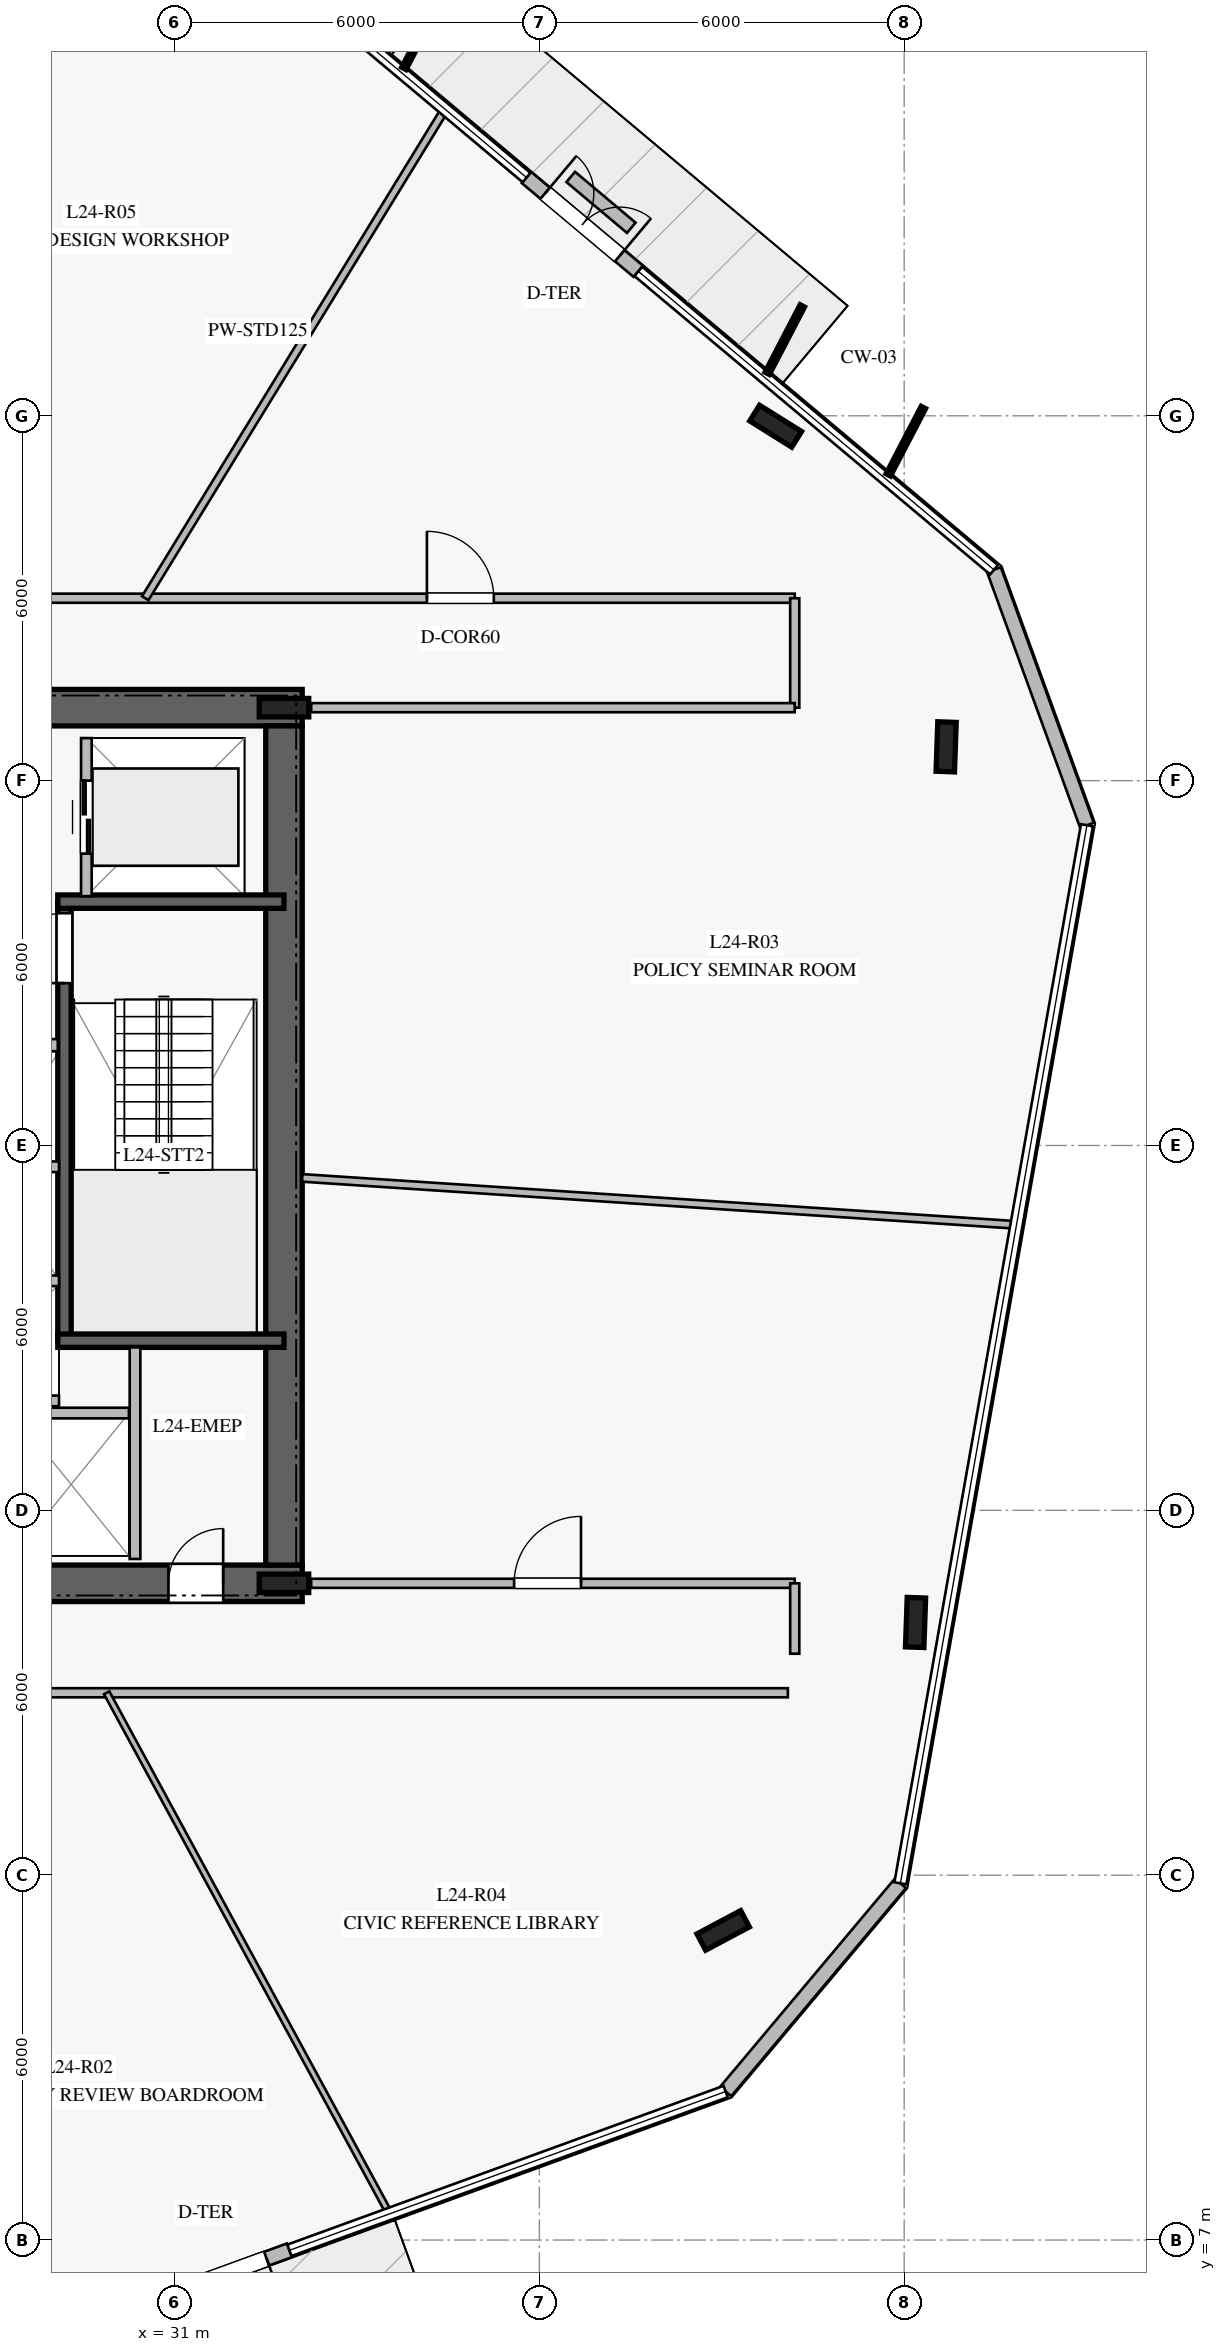
"""IFC4 building model, lengths in metres.
Left out: names, types, materials, properties, quantities, classifications, styles, units other than length and angle.
Written with IfcOpenShell. Run it as: python <this file> out.ifc"""

import sys

from ifc_helpers import new_model, si_unit, direction, frame, frame_2d, origin, origin_2d, place, context, subcontext, project, spatial, rectangle, i_section, extrude, element, fill, save


model = new_model("IFC4")
c1 = context("Model", 3, precision=1e-05, world=origin(), true_north=direction((0.0, 1.0)))
c2 = subcontext(c1, "Body", "Model", "MODEL_VIEW")
j1 = project(units=[si_unit("LENGTHUNIT", "METRE"), si_unit("PLANEANGLEUNIT", "RADIAN")], contexts=[c1])
p1 = place(None, origin())
s1 = spatial("IfcSite", under=j1, at=p1, CompositionType="ELEMENT")
p2 = place(p1, origin())
s2 = spatial("IfcBuilding", under=s1, at=p2, CompositionType="ELEMENT")
p3 = place(p2, frame((0.0, 0.0, 102.4)))
s3 = spatial("IfcBuildingStorey", under=s2, at=p3, CompositionType="ELEMENT", Elevation=102.4)
p4 = place(p3, frame((16.9, 17.8, 0.0), z_axis=(0.0, 0.0, 1.0), x_axis=(1.0, 0.0, 0.0)))
e1 = element("IfcWall", 1, at=p4, inside=s3, PredefinedType="SHEAR", context=c2, shape_type="SweptSolid", body=[
    extrude(rectangle(XDim=16.2, YDim=0.6, at=frame_2d((8.1, 0.0))), origin(), (0.0, 0.0, 1.0), 3.76),
])
p5 = place(p4, frame((5.05, 0.0, 0.0)))
e2 = element("IfcOpeningElement", 2, at=p5, cuts=e1, PredefinedType="OPENING", context=c2, shape_type="SweptSolid", body=[
    extrude(rectangle(XDim=1.2, YDim=2.25, at=frame_2d((0.6, 1.125))), frame((0.0, 0.31, 0.0), z_axis=(0.0, -1.0, 0.0), x_axis=(1.0, 0.0, 0.0)), (0.0, 0.0, 1.0), 0.62),
])
p6 = place(p4, frame((14.0, 0.0, 0.0)))
e3 = element("IfcOpeningElement", 3, at=p6, cuts=e1, PredefinedType="OPENING", context=c2, shape_type="SweptSolid", body=[
    extrude(rectangle(XDim=0.9, YDim=2.1, at=frame_2d((0.45, 1.05))), frame((0.0, 0.31, 0.0), z_axis=(0.0, -1.0, 0.0), x_axis=(1.0, 0.0, 0.0)), (0.0, 0.0, 1.0), 0.62),
])
p7 = place(p3, frame((33.1, 32.2, 0.0), z_axis=(0.0, 0.0, 1.0), x_axis=(-1.0, 0.0, 0.0)))
e4 = element("IfcWall", 4, at=p7, inside=s3, PredefinedType="SHEAR", context=c2, shape_type="SweptSolid", body=[
    extrude(rectangle(XDim=16.2, YDim=0.6, at=frame_2d((8.1, 0.0))), origin(), (0.0, 0.0, 1.0), 3.76),
])
p8 = place(p7, frame((5.05, 0.0, 0.0)))
e5 = element("IfcOpeningElement", 5, at=p8, cuts=e4, PredefinedType="OPENING", context=c2, shape_type="SweptSolid", body=[
    extrude(rectangle(XDim=1.2, YDim=2.25, at=frame_2d((0.6, 1.125))), frame((0.0, 0.31, 0.0), z_axis=(0.0, -1.0, 0.0), x_axis=(1.0, 0.0, 0.0)), (0.0, 0.0, 1.0), 0.62),
])
p9 = place(p7, frame((11.85, 0.0, 0.0)))
e6 = element("IfcOpeningElement", 6, at=p9, cuts=e4, PredefinedType="OPENING", context=c2, shape_type="SweptSolid", body=[
    extrude(rectangle(XDim=1.1, YDim=2.2, at=frame_2d((0.55, 1.1))), frame((0.0, 0.31, 0.0), z_axis=(0.0, -1.0, 0.0), x_axis=(1.0, 0.0, 0.0)), (0.0, 0.0, 1.0), 0.62),
])
p10 = place(p7, frame((9.875, 0.0, 0.0)))
e7 = element("IfcOpeningElement", 7, at=p10, cuts=e4, PredefinedType="OPENING", context=c2, shape_type="SweptSolid", body=[
    extrude(rectangle(XDim=1.1, YDim=2.2, at=frame_2d((0.55, 1.1))), frame((0.0, 0.31, 0.0), z_axis=(0.0, -1.0, 0.0), x_axis=(1.0, 0.0, 0.0)), (0.0, 0.0, 1.0), 0.62),
])
p11 = place(p7, frame((7.9, 0.0, 0.0)))
e8 = element("IfcOpeningElement", 8, at=p11, cuts=e4, PredefinedType="OPENING", context=c2, shape_type="SweptSolid", body=[
    extrude(rectangle(XDim=1.1, YDim=2.2, at=frame_2d((0.55, 1.1))), frame((0.0, 0.31, 0.0), z_axis=(0.0, -1.0, 0.0), x_axis=(1.0, 0.0, 0.0)), (0.0, 0.0, 1.0), 0.62),
])
p12 = place(p3, frame((32.8, 18.1, 0.0), z_axis=(0.0, 0.0, 1.0), x_axis=(0.0, 1.0, 0.0)))
e9 = element("IfcWall", 9, at=p12, inside=s3, PredefinedType="SHEAR", context=c2, shape_type="SweptSolid", body=[
    extrude(rectangle(XDim=13.8, YDim=0.6, at=frame_2d((6.9, 0.0))), origin(), (0.0, 0.0, 1.0), 3.76),
])
for number, where, z_axis, x_axis in (
    (10, (32.8, 17.8, 0.0), (0.0, 0.0, 1.0), (1.0, 0.0, 0.0)),
    (11, (32.8, 32.2, 0.0), (0.0, 0.0, 1.0), (1.0, 0.0, 0.0)),
):
    element("IfcColumn", number, at=place(p3, frame(where, z_axis=z_axis, x_axis=x_axis)), inside=s3, PredefinedType="COLUMN", context=c2, shape_type="SweptSolid", body=[
        extrude(i_section(OverallWidth=0.303, OverallDepth=0.814, WebThickness=0.021, FlangeThickness=0.04, at=origin_2d()), origin(), (0.0, 0.0, 1.0), 4.0),
    ])
p13 = place(p3, frame((29.19, 21.79, 0.0), z_axis=(0.0, 0.0, 1.0), x_axis=(0.0, 1.0, 0.0)))
e12 = element("IfcWall", 12, at=p13, inside=s3, PredefinedType="SOLIDWALL", context=c2, shape_type="SweptSolid", body=[
    extrude(rectangle(XDim=7.22, YDim=0.22, at=frame_2d((3.61, 0.0))), origin(), (0.0, 0.0, 1.0), 3.76),
])
p14 = place(p13, frame((5.88, 0.0, 0.0)))
e13 = element("IfcOpeningElement", 13, at=p14, cuts=e12, PredefinedType="OPENING", context=c2, shape_type="SweptSolid", body=[
    extrude(rectangle(XDim=1.15, YDim=2.2, at=frame_2d((0.575, 1.1))), frame((0.0, 0.12, 0.0), z_axis=(0.0, -1.0, 0.0), x_axis=(1.0, 0.0, 0.0)), (0.0, 0.0, 1.0), 0.24),
])
for number, where, z_axis, x_axis in (
    (14, (29.08, 21.79, 0.0), (0.0, 0.0, 1.0), (1.0, 0.0, 0.0)),
    (15, (29.08, 29.01, 0.0), (0.0, 0.0, 1.0), (1.0, 0.0, 0.0)),
):
    element("IfcWall", number, at=place(p3, frame(where, z_axis=z_axis, x_axis=x_axis)), inside=s3, PredefinedType="SOLIDWALL", context=c2, shape_type="SweptSolid", body=[
        extrude(rectangle(XDim=3.72, YDim=0.22, at=frame_2d((1.86, 0.0))), origin(), (0.0, 0.0, 1.0), 3.76),
    ])
for number, where, z_axis, x_axis in (
    (16, (40.886, 36.829, 0.0), (0.0, 0.0, 1.0), (-0.848, 0.53, 0.0)),
    (17, (40.023, 12.092, 0.0), (0.0, 0.0, 1.0), (0.883, 0.469, 0.0)),
    (18, (43.187, 17.156, 0.0), (0.0, 0.0, 1.0), (0.035, 0.999, 0.0)),
    (19, (43.69, 31.556, 0.0), (0.0, 0.0, 1.0), (0.035, 0.999, 0.0)),
):
    element("IfcColumn", number, at=place(p3, frame(where, z_axis=z_axis, x_axis=x_axis)), inside=s3, PredefinedType="COLUMN", context=c2, shape_type="SweptSolid", body=[
        extrude(i_section(OverallWidth=0.303, OverallDepth=0.814, WebThickness=0.021, FlangeThickness=0.04, at=origin_2d()), origin(), (0.0, 0.0, 1.0), 4.0),
    ])
p15 = place(p3, frame((38.628, 39.375, 0.0), z_axis=(0.0, 0.0, 1.0), x_axis=(-0.766049372112, 0.642781735495, 0.0)))
e20 = element("IfcWall", 20, at=p15, inside=s3, PredefinedType="STANDARD", context=c2, shape_type="SweptSolid", body=[
    extrude(rectangle(XDim=2.4, YDim=0.24, at=frame_2d((1.2, 0.0))), origin(), (0.0, 0.0, 1.0), 3.76),
])
p16 = place(p15, frame((0.4, 0.0, 0.0)))
e21 = element("IfcOpeningElement", 21, at=p16, cuts=e20, PredefinedType="OPENING", context=c2, shape_type="SweptSolid", body=[
    extrude(rectangle(XDim=1.6, YDim=2.25, at=frame_2d((0.8, 1.125))), frame((0.0, 0.13, 0.0), z_axis=(0.0, -1.0, 0.0), x_axis=(1.0, 0.0, 0.0)), (0.0, 0.0, 1.0), 0.26),
])
p17 = place(p3, frame((30.635, 6.01, 0.0), z_axis=(0.0, 0.0, 1.0), x_axis=(0.939647786753, 0.342143298706, 0.0)))
e22 = element("IfcWall", 22, at=p17, inside=s3, PredefinedType="STANDARD", context=c2, shape_type="SweptSolid", body=[
    extrude(rectangle(XDim=2.4, YDim=0.24, at=frame_2d((1.2, 0.0))), origin(), (0.0, 0.0, 1.0), 3.76),
])
p18 = place(p17, frame((0.4, 0.0, 0.0)))
e23 = element("IfcOpeningElement", 23, at=p18, cuts=e22, PredefinedType="OPENING", context=c2, shape_type="SweptSolid", body=[
    extrude(rectangle(XDim=1.6, YDim=2.25, at=frame_2d((0.8, 1.125))), frame((0.0, 0.13, 0.0), z_axis=(0.0, -1.0, 0.0), x_axis=(1.0, 0.0, 0.0)), (0.0, 0.0, 1.0), 0.26),
])
for number, where, z_axis, x_axis in (
    (24, (40.064, 9.442, 0.0), (0.0, 0.0, 1.0), (0.643, 0.766, 0.0)),
    (25, (46.006, 30.267, 0.0), (0.0, 0.0, 1.0), (-0.342, 0.94, 0.0)),
):
    element("IfcWall", number, at=place(p3, frame(where, z_axis=z_axis, x_axis=x_axis)), inside=s3, PredefinedType="STANDARD", context=c2, shape_type="SweptSolid", body=[
        extrude(rectangle(XDim=4.47, YDim=0.24, at=frame_2d((2.235, 0.0))), origin(), (0.0, 0.0, 1.0), 3.76),
    ])
p19 = place(p3, frame((38.512, 40.092, 0.0), z_axis=(0.0, 0.0, 1.0), x_axis=(-0.765923066334, 0.642932233177, 0.0)))
e26 = element("IfcWall", 26, at=p19, inside=s3, PredefinedType="USERDEFINED", context=c2, shape_type="SweptSolid", body=[
    extrude(rectangle(XDim=1.3, YDim=0.22, at=frame_2d((0.65, 0.0))), origin(), (0.0, 0.0, 1.0), 0.4),
])
p20 = place(p3, frame((25.7, 26.65, 0.0), z_axis=(0.0, 0.0, 1.0), x_axis=(1.0, 0.0, 0.0)))
e27 = element("IfcWall", 27, at=p20, inside=s3, PredefinedType="PARTITIONING", context=c2, shape_type="SweptSolid", body=[
    extrude(rectangle(XDim=3.38, YDim=0.2, at=frame_2d((1.69, 0.0))), origin(), (0.0, 0.0, 1.0), 3.76),
])
p21 = place(p3, frame((30.35, 18.2, 0.0), z_axis=(0.0, 0.0, 1.0), x_axis=(0.0, 1.0, 0.0)))
e28 = element("IfcWall", 28, at=p21, inside=s3, PredefinedType="PARTITIONING", context=c2, shape_type="SweptSolid", body=[
    extrude(rectangle(XDim=3.48, YDim=0.175, at=frame_2d((1.74, 0.0))), origin(), (0.0, 0.0, 1.0), 3.76),
])
p22 = place(p3, frame((28.35, 20.6, 0.0), z_axis=(0.0, 0.0, 1.0), x_axis=(1.0, 0.0, 0.0)))
e29 = element("IfcWall", 29, at=p22, inside=s3, PredefinedType="PARTITIONING", context=c2, shape_type="SweptSolid", body=[
    extrude(rectangle(XDim=1.9, YDim=0.175, at=frame_2d((0.95, 0.0))), origin(), (0.0, 0.0, 1.0), 3.76),
])
for number, where, z_axis, x_axis in (
    (30, (26.75, 20.8, 0.0), (0.0, 0.0, 1.0), (1.0, 0.0, 0.0)),
    (31, (26.75, 22.775, 0.0), (0.0, 0.0, 1.0), (1.0, 0.0, 0.0)),
    (32, (26.75, 24.65, 0.0), (0.0, 0.0, 1.0), (1.0, 0.0, 0.0)),
):
    element("IfcWall", number, at=place(p3, frame(where, z_axis=z_axis, x_axis=x_axis)), inside=s3, PredefinedType="PARTITIONING", context=c2, shape_type="SweptSolid", body=[
        extrude(rectangle(XDim=2.35, YDim=0.175, at=frame_2d((1.175, 0.0))), origin(), (0.0, 0.0, 1.0), 3.76),
    ])
p23 = place(p3, frame((29.55, 29.1, 0.0), z_axis=(0.0, 0.0, 1.0), x_axis=(0.0, 1.0, 0.0)))
e33 = element("IfcWall", 33, at=p23, inside=s3, PredefinedType="PARTITIONING", context=c2, shape_type="SweptSolid", body=[
    extrude(rectangle(XDim=2.6, YDim=0.175, at=frame_2d((1.3, 0.0))), origin(), (0.0, 0.0, 1.0), 3.76),
])
p24 = place(p23, frame((0.7, 0.0, 0.0)))
e34 = element("IfcOpeningElement", 34, at=p24, cuts=e33, PredefinedType="OPENING", context=c2, shape_type="SweptSolid", body=[
    extrude(rectangle(XDim=1.2, YDim=2.2, at=frame_2d((0.6, 1.1))), frame((0.0, 0.098, 0.0), z_axis=(0.0, -1.0, 0.0), x_axis=(1.0, 0.0, 0.0)), (0.0, 0.0, 1.0), 0.195),
])
p25 = place(p3, frame((25.95, 34.0, 0.0), z_axis=(0.0, 0.0, 1.0), x_axis=(1.0, 0.0, 0.0)))
e35 = element("IfcWall", 35, at=p25, inside=s3, PredefinedType="PARTITIONING", context=c2, shape_type="SweptSolid", body=[
    extrude(rectangle(XDim=15.25, YDim=0.15, at=frame_2d((7.625, 0.0))), origin(), (0.0, 0.0, 1.0), 3.21),
])
p26 = place(p25, frame((9.201, 0.0, 0.0)))
e36 = element("IfcOpeningElement", 36, at=p26, cuts=e35, PredefinedType="OPENING", context=c2, shape_type="SweptSolid", body=[
    extrude(rectangle(XDim=1.1, YDim=2.2, at=frame_2d((0.55, 1.1))), frame((0.0, 0.085, 0.0), z_axis=(0.0, -1.0, 0.0), x_axis=(1.0, 0.0, 0.0)), (0.0, 0.0, 1.0), 0.17),
])
p27 = place(p3, frame((41.2, 34.0, 0.0), z_axis=(0.0, 0.0, 1.0), x_axis=(0.0, -1.0, 0.0)))
e37 = element("IfcWall", 37, at=p27, inside=s3, PredefinedType="PARTITIONING", context=c2, shape_type="SweptSolid", body=[
    extrude(rectangle(XDim=1.8, YDim=0.15, at=frame_2d((0.9, 0.0))), origin(), (0.0, 0.0, 1.0), 3.76),
])
p28 = place(p3, frame((41.2, 32.2, 0.0), z_axis=(0.0, 0.0, 1.0), x_axis=(-1.0, 0.0, 0.0)))
e38 = element("IfcWall", 38, at=p28, inside=s3, PredefinedType="PARTITIONING", context=c2, shape_type="SweptSolid", body=[
    extrude(rectangle(XDim=7.953, YDim=0.15, at=frame_2d((3.977, 0.0))), origin(), (0.0, 0.0, 1.0), 3.21),
])
p29 = place(p3, frame((33.247, 17.8, 0.0), z_axis=(0.0, 0.0, 1.0), x_axis=(1.0, 0.0, 0.0)))
e39 = element("IfcWall", 39, at=p29, inside=s3, PredefinedType="PARTITIONING", context=c2, shape_type="SweptSolid", body=[
    extrude(rectangle(XDim=7.953, YDim=0.15, at=frame_2d((3.977, 0.0))), origin(), (0.0, 0.0, 1.0), 3.05),
])
p30 = place(p29, frame((3.338, 0.0, 0.0)))
e40 = element("IfcOpeningElement", 40, at=p30, cuts=e39, PredefinedType="OPENING", context=c2, shape_type="SweptSolid", body=[
    extrude(rectangle(XDim=1.1, YDim=2.2, at=frame_2d((0.55, 1.1))), frame((0.0, 0.085, 0.0), z_axis=(0.0, -1.0, 0.0), x_axis=(1.0, 0.0, 0.0)), (0.0, 0.0, 1.0), 0.17),
])
p31 = place(p3, frame((41.2, 17.8, 0.0), z_axis=(0.0, 0.0, 1.0), x_axis=(0.0, -1.0, 0.0)))
e41 = element("IfcWall", 41, at=p31, inside=s3, PredefinedType="PARTITIONING", context=c2, shape_type="SweptSolid", body=[
    extrude(rectangle(XDim=1.158, YDim=0.15, at=frame_2d((0.579, 0.0))), origin(), (0.0, 0.0, 1.0), 3.21),
])
p32 = place(p3, frame((41.087, 16.0, 0.0), z_axis=(0.0, 0.0, 1.0), x_axis=(-1.0, 0.0, 0.0)))
e42 = element("IfcWall", 42, at=p32, inside=s3, PredefinedType="PARTITIONING", context=c2, shape_type="SweptSolid", body=[
    extrude(rectangle(XDim=15.137, YDim=0.15, at=frame_2d((7.568, 0.0))), origin(), (0.0, 0.0, 1.0), 3.21),
])
p33 = place(p32, frame((12.332, 0.0, 0.0)))
e43 = element("IfcOpeningElement", 43, at=p33, cuts=e42, PredefinedType="OPENING", context=c2, shape_type="SweptSolid", body=[
    extrude(rectangle(XDim=1.1, YDim=2.2, at=frame_2d((0.55, 1.1))), frame((0.0, 0.085, 0.0), z_axis=(0.0, -1.0, 0.0), x_axis=(1.0, 0.0, 0.0)), (0.0, 0.0, 1.0), 0.17),
])
p34 = place(p3, frame((30.518, 34.0, 0.0), z_axis=(0.0, 0.0, 1.0), x_axis=(0.522673308886, 0.852533056355, 0.0)))
e44 = element("IfcWall", 44, at=p34, inside=s3, PredefinedType="PARTITIONING", context=c2, shape_type="SweptSolid", body=[
    extrude(rectangle(XDim=9.417, YDim=0.125, at=frame_2d((4.708, 0.0))), origin(), (0.0, 0.0, 1.0), 3.16),
])
p35 = place(p3, frame((29.884, 16.0, 0.0), z_axis=(0.0, 0.0, 1.0), x_axis=(0.477009387534, -0.878898199, 0.0)))
e45 = element("IfcWall", 45, at=p35, inside=s3, PredefinedType="MOVABLE", context=c2, shape_type="SweptSolid", body=[
    extrude(rectangle(XDim=9.734, YDim=0.1, at=frame_2d((4.867, 0.0))), origin(), (0.0, 0.0, 1.0), 3.16),
])
p36 = place(p3, frame((33.1, 24.467, 0.0), z_axis=(0.0, 0.0, 1.0), x_axis=(0.997841404392, -0.06566986889, 0.0)))
e46 = element("IfcWall", 46, at=p36, inside=s3, PredefinedType="PARTITIONING", context=c2, shape_type="SweptSolid", body=[
    extrude(rectangle(XDim=11.755, YDim=0.125, at=frame_2d((5.878, 0.0))), origin(), (0.0, 0.0, 1.0), 3.05),
])
p37 = place(p16, frame((1.6, 0.0, 0.0), z_axis=(0.0, 0.0, 1.0), x_axis=(-1.0, 0.0, 0.0)))
e47 = element("IfcDoor", 47, at=p37, inside=s3, OperationType="DOUBLE_DOOR_SINGLE_SWING", PredefinedType="DOOR", context=c2, shape_type="SweptSolid", body=[
    extrude(rectangle(XDim=1.6, YDim=2.25, at=frame_2d((0.8, 1.125))), frame((0.0, 0.025, 0.0), z_axis=(0.0, -1.0, 0.0), x_axis=(1.0, 0.0, 0.0)), (0.0, 0.0, 1.0), 0.05),
])
fill(e21, e47)
p38 = place(p18, frame((1.6, 0.0, 0.0), z_axis=(0.0, 0.0, 1.0), x_axis=(-1.0, 0.0, 0.0)))
e48 = element("IfcDoor", 48, at=p38, inside=s3, OperationType="DOUBLE_DOOR_SINGLE_SWING", PredefinedType="DOOR", context=c2, shape_type="SweptSolid", body=[
    extrude(rectangle(XDim=1.6, YDim=2.25, at=frame_2d((0.8, 1.125))), frame((0.0, 0.025, 0.0), z_axis=(0.0, -1.0, 0.0), x_axis=(1.0, 0.0, 0.0)), (0.0, 0.0, 1.0), 0.05),
])
fill(e23, e48)
p39 = place(p14, origin())
e49 = element("IfcDoor", 49, at=p39, inside=s3, OperationType="SINGLE_SWING_LEFT", PredefinedType="DOOR", context=c2, shape_type="SweptSolid", body=[
    extrude(rectangle(XDim=1.15, YDim=2.2, at=frame_2d((0.575, 1.1))), frame((0.0, 0.025, 0.0), z_axis=(0.0, -1.0, 0.0), x_axis=(1.0, 0.0, 0.0)), (0.0, 0.0, 1.0), 0.05),
])
fill(e13, e49)
p40 = place(p6, origin())
e50 = element("IfcDoor", 50, at=p40, inside=s3, OperationType="SINGLE_SWING_RIGHT", PredefinedType="DOOR", context=c2, shape_type="SweptSolid", body=[
    extrude(rectangle(XDim=0.9, YDim=2.1, at=frame_2d((0.45, 1.05))), frame((0.0, 0.025, 0.0), z_axis=(0.0, -1.0, 0.0), x_axis=(1.0, 0.0, 0.0)), (0.0, 0.0, 1.0), 0.05),
])
fill(e3, e50)
p41 = place(p24, origin())
e51 = element("IfcDoor", 51, at=p41, inside=s3, OperationType="DOUBLE_DOOR_SLIDING", PredefinedType="DOOR", context=c2, shape_type="SweptSolid", body=[
    extrude(rectangle(XDim=1.2, YDim=2.2, at=frame_2d((0.6, 1.1))), frame((0.0, 0.025, 0.0), z_axis=(0.0, -1.0, 0.0), x_axis=(1.0, 0.0, 0.0)), (0.0, 0.0, 1.0), 0.05),
])
fill(e34, e51)
p42 = place(p26, origin())
e52 = element("IfcDoor", 52, at=p42, inside=s3, OperationType="SINGLE_SWING_LEFT", PredefinedType="DOOR", context=c2, shape_type="SweptSolid", body=[
    extrude(rectangle(XDim=1.1, YDim=2.2, at=frame_2d((0.55, 1.1))), frame((0.0, 0.025, 0.0), z_axis=(0.0, -1.0, 0.0), x_axis=(1.0, 0.0, 0.0)), (0.0, 0.0, 1.0), 0.05),
])
fill(e36, e52)
p43 = place(p30, origin())
e53 = element("IfcDoor", 53, at=p43, inside=s3, OperationType="SINGLE_SWING_RIGHT", PredefinedType="DOOR", context=c2, shape_type="SweptSolid", body=[
    extrude(rectangle(XDim=1.1, YDim=2.2, at=frame_2d((0.55, 1.1))), frame((0.0, 0.025, 0.0), z_axis=(0.0, -1.0, 0.0), x_axis=(1.0, 0.0, 0.0)), (0.0, 0.0, 1.0), 0.05),
])
fill(e40, e53)
save(model, sys.argv[1])
